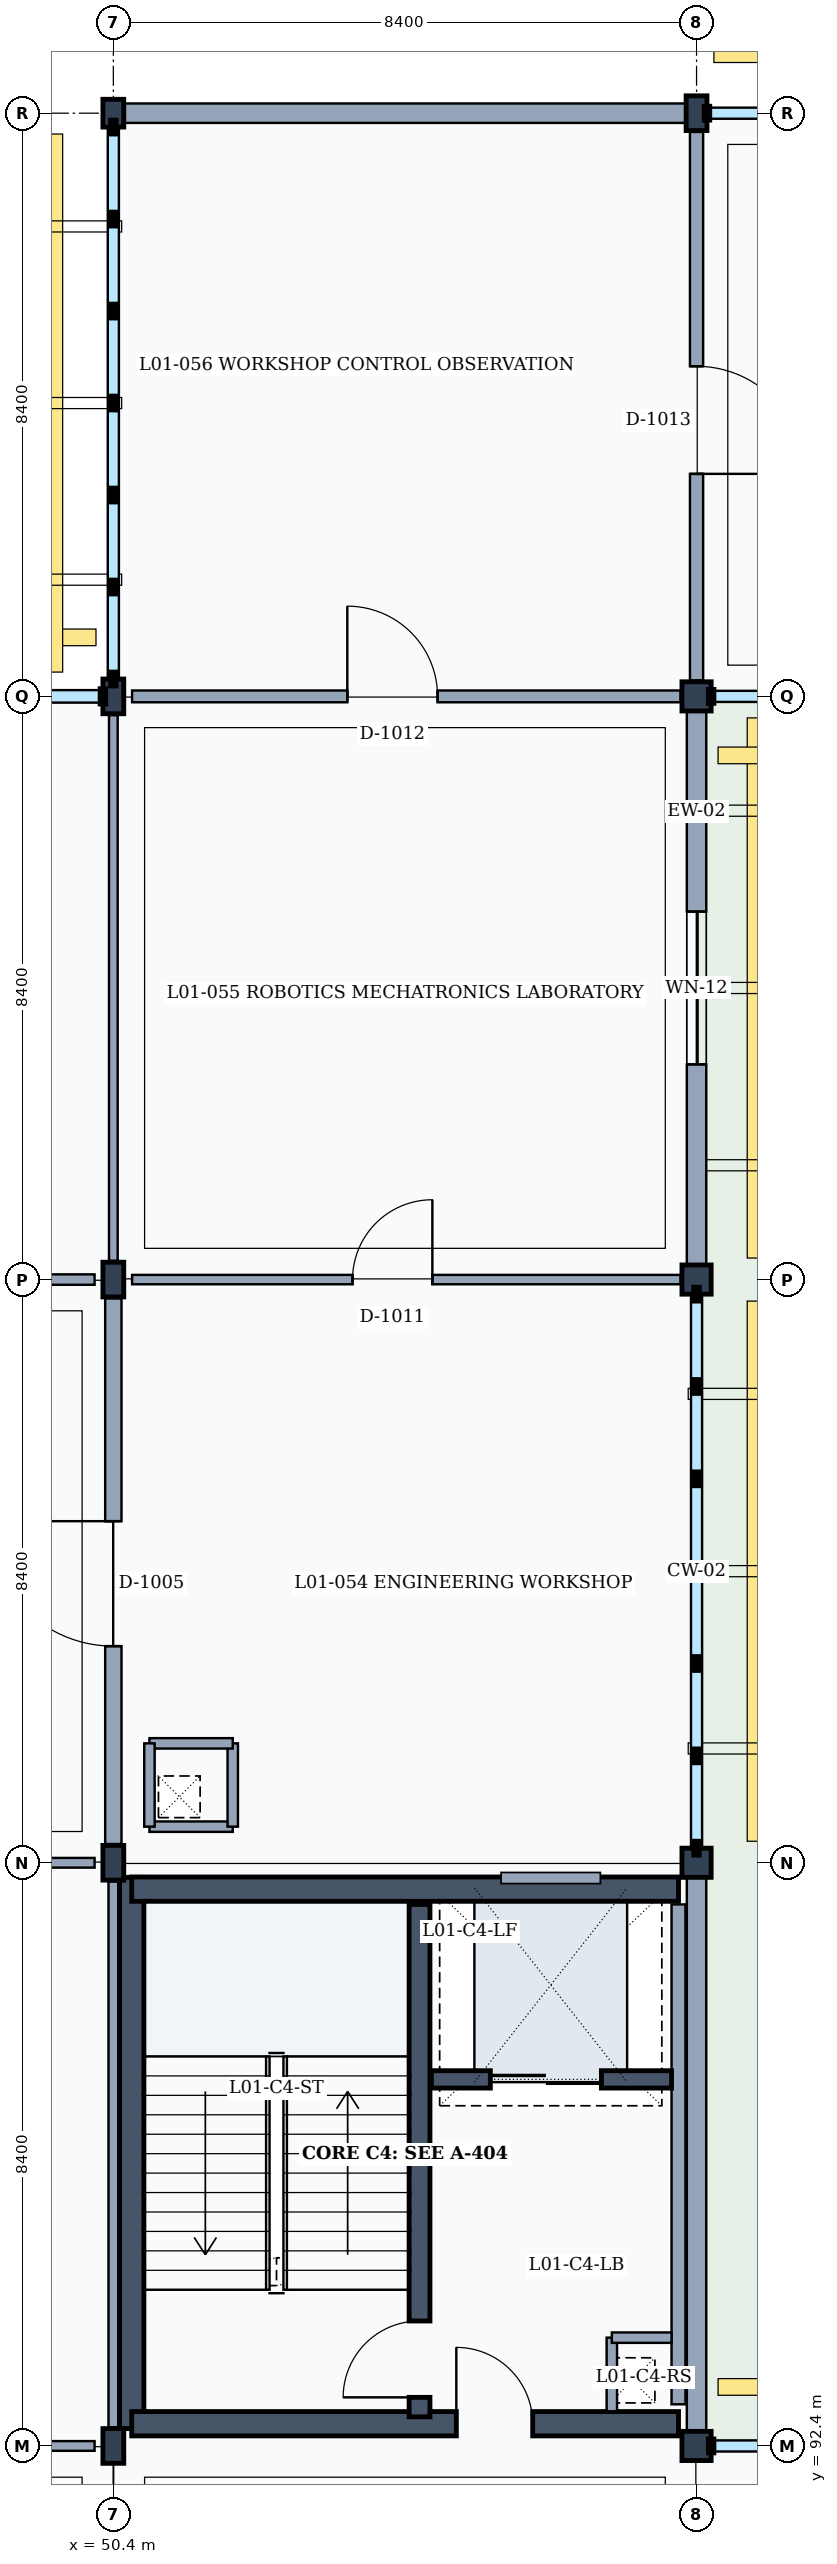
"""IFC4 building model, lengths in metres.
Left out: names, types, materials, properties, quantities, classifications, styles, units other than length and angle.
Written with IfcOpenShell. Run it as: python <this file> out.ifc"""

import sys

from ifc_helpers import new_model, si_unit, direction, frame, frame_2d, origin, origin_2d, place, context, subcontext, project, spatial, rectangle, i_section, extrude, element, fill, save


model = new_model("IFC4")
c1 = context("Model", 3, precision=1e-05, world=origin(), true_north=direction((0.0, 1.0)))
c2 = subcontext(c1, "Body", "Model", "MODEL_VIEW")
j1 = project(units=[si_unit("LENGTHUNIT", "METRE"), si_unit("PLANEANGLEUNIT", "RADIAN")], contexts=[c1])
p1 = place(None, origin())
s1 = spatial("IfcSite", under=j1, at=p1, CompositionType="ELEMENT")
p2 = place(p1, origin())
s2 = spatial("IfcBuilding", under=s1, at=p2, CompositionType="ELEMENT")
p3 = place(p2, frame((0.0, 0.0, 4.8)))
s3 = spatial("IfcBuildingStorey", under=s2, at=p3, CompositionType="ELEMENT", Elevation=4.8)
for number, where, z_axis, x_axis in (
    (1, (50.4, 92.4, 0.0), (0.0, 0.0, 1.0), (1.0, 0.0, 0.0)),
    (2, (50.4, 100.8, 0.0), (0.0, 0.0, 1.0), (1.0, 0.0, 0.0)),
    (3, (50.4, 109.2, 0.0), (0.0, 0.0, 1.0), (1.0, 0.0, 0.0)),
    (4, (50.4, 117.6, 0.0), (0.0, 0.0, 1.0), (1.0, 0.0, 0.0)),
):
    element("IfcColumn", number, at=place(p3, frame(where, z_axis=z_axis, x_axis=x_axis)), inside=s3, PredefinedType="COLUMN", context=c2, shape_type="SweptSolid", body=[
        extrude(i_section(OverallWidth=0.3, OverallDepth=0.5, WebThickness=0.014, FlangeThickness=0.028, FilletRadius=0.027, at=origin_2d()), origin(), (0.0, 0.0, 1.0), 4.8),
    ])
p4 = place(p3, frame((50.4, 126.0, 0.0), z_axis=(0.0, 0.0, 1.0), x_axis=(1.0, 0.0, 0.0)))
e5 = element("IfcColumn", 5, at=p4, inside=s3, PredefinedType="COLUMN", context=c2, shape_type="SweptSolid", body=[
    extrude(i_section(OverallWidth=0.3, OverallDepth=0.4, WebThickness=0.013, FlangeThickness=0.024, FilletRadius=0.027, at=origin_2d()), origin(), (0.0, 0.0, 1.0), 4.8),
])
for number, where, z_axis, x_axis in (
    (6, (58.8, 92.4, 0.0), (0.0, 0.0, 1.0), (1.0, 0.0, 0.0)),
    (7, (58.8, 100.8, 0.0), (0.0, 0.0, 1.0), (1.0, 0.0, 0.0)),
    (8, (58.8, 109.2, 0.0), (0.0, 0.0, 1.0), (1.0, 0.0, 0.0)),
    (9, (58.8, 117.6, 0.0), (0.0, 0.0, 1.0), (1.0, 0.0, 0.0)),
):
    element("IfcColumn", number, at=place(p3, frame(where, z_axis=z_axis, x_axis=x_axis)), inside=s3, PredefinedType="COLUMN", context=c2, shape_type="SweptSolid", body=[
        extrude(rectangle(XDim=0.42, YDim=0.42, at=origin_2d()), origin(), (0.0, 0.0, 1.0), 4.8),
    ])
p5 = place(p3, frame((58.8, 126.0, 0.0), z_axis=(0.0, 0.0, 1.0), x_axis=(1.0, 0.0, 0.0)))
e10 = element("IfcColumn", 10, at=p5, inside=s3, PredefinedType="COLUMN", context=c2, shape_type="SweptSolid", body=[
    extrude(i_section(OverallWidth=0.3, OverallDepth=0.5, WebThickness=0.014, FlangeThickness=0.028, FilletRadius=0.027, at=origin_2d()), origin(), (0.0, 0.0, 1.0), 4.8),
])
p6 = place(p3, frame((58.8, 100.59, 0.0), z_axis=(0.0, 0.0, 1.0), x_axis=(0.0, -1.0, 0.0)))
e11 = element("IfcWall", 11, at=p6, inside=s3, PredefinedType="SOLIDWALL", context=c2, shape_type="SweptSolid", body=[
    extrude(rectangle(XDim=7.98, YDim=0.28, at=frame_2d((3.99, 0.0))), origin(), (0.0, 0.0, 1.0), 3.96),
])
p7 = place(p3, frame((58.8, 117.39, 0.0), z_axis=(0.0, 0.0, 1.0), x_axis=(0.0, -1.0, 0.0)))
e12 = element("IfcWall", 12, at=p7, inside=s3, PredefinedType="SOLIDWALL", context=c2, shape_type="SweptSolid", body=[
    extrude(rectangle(XDim=7.98, YDim=0.28, at=frame_2d((3.99, 0.0))), origin(), (0.0, 0.0, 1.0), 3.96),
])
p8 = place(p7, frame((2.89, 0.0, 0.9)))
e13 = element("IfcOpeningElement", 13, at=p8, cuts=e12, PredefinedType="OPENING", context=c2, shape_type="SweptSolid", body=[
    extrude(rectangle(XDim=2.2, YDim=1.9, at=frame_2d((1.1, 0.95))), frame((0.0, 0.15, 0.0), z_axis=(0.0, -1.0, 0.0), x_axis=(1.0, 0.0, 0.0)), (0.0, 0.0, 1.0), 0.3),
])
p9 = place(p3, frame((50.55, 126.0, 0.0), z_axis=(0.0, 0.0, 1.0), x_axis=(1.0, 0.0, 0.0)))
e14 = element("IfcWall", 14, at=p9, inside=s3, PredefinedType="SOLIDWALL", context=c2, shape_type="SweptSolid", body=[
    extrude(rectangle(XDim=8.1, YDim=0.28, at=frame_2d((4.05, 0.0))), origin(), (0.0, 0.0, 1.0), 3.96),
])
p10 = place(p3, frame((50.665, 92.65, 0.0), z_axis=(0.0, 0.0, 1.0), x_axis=(0.0, 1.0, 0.0)))
e15 = element("IfcWall", 15, at=p10, inside=s3, PredefinedType="SHEAR", context=c2, shape_type="SweptSolid", body=[
    extrude(rectangle(XDim=7.94, YDim=0.35, at=frame_2d((3.97, 0.0))), origin(), (0.0, 0.0, 1.0), 4.56),
])
p11 = place(p3, frame((50.665, 100.42, 0.0), z_axis=(0.0, 0.0, 1.0), x_axis=(1.0, 0.0, 0.0)))
e16 = element("IfcWall", 16, at=p11, inside=s3, PredefinedType="SHEAR", context=c2, shape_type="SweptSolid", body=[
    extrude(rectangle(XDim=7.875, YDim=0.35, at=frame_2d((3.938, 0.0))), origin(), (0.0, 0.0, 1.0), 4.56),
])
p12 = place(p3, frame((58.54, 100.2, 0.0), z_axis=(0.0, 0.0, 1.0), x_axis=(0.0, -1.0, 0.0)))
e17 = element("IfcWall", 17, at=p12, inside=s3, PredefinedType="PARTITIONING", context=c2, shape_type="SweptSolid", body=[
    extrude(rectangle(XDim=7.2, YDim=0.2, at=frame_2d((3.6, 0.0))), origin(), (0.0, 0.0, 1.0), 3.92),
])
p13 = place(p3, frame((58.54, 92.72, 0.0), z_axis=(0.0, 0.0, 1.0), x_axis=(-1.0, 0.0, 0.0)))
e18 = element("IfcWall", 18, at=p13, inside=s3, PredefinedType="SHEAR", context=c2, shape_type="SweptSolid", body=[
    extrude(rectangle(XDim=7.875, YDim=0.35, at=frame_2d((3.938, 0.0))), origin(), (0.0, 0.0, 1.0), 4.56),
])
p14 = place(p13, frame((2.1, 0.0, 0.0)))
e19 = element("IfcOpeningElement", 19, at=p14, cuts=e18, PredefinedType="OPENING", context=c2, shape_type="SweptSolid", body=[
    extrude(rectangle(XDim=1.1, YDim=2.15, at=frame_2d((0.55, 1.075))), frame((0.0, 0.185, 0.0), z_axis=(0.0, -1.0, 0.0), x_axis=(1.0, 0.0, 0.0)), (0.0, 0.0, 1.0), 0.37),
])
p15 = place(p3, frame((54.81, 92.82, 0.0), z_axis=(0.0, 0.0, 1.0), x_axis=(0.0, 1.0, 0.0)))
e20 = element("IfcWall", 20, at=p15, inside=s3, PredefinedType="SHEAR", context=c2, shape_type="SweptSolid", body=[
    extrude(rectangle(XDim=7.38, YDim=0.3, at=frame_2d((3.69, 0.0))), origin(), (0.0, 0.0, 1.0), 4.56),
])
p16 = place(p15, frame((0.28, 0.0, 0.0)))
e21 = element("IfcOpeningElement", 21, at=p16, cuts=e20, PredefinedType="OPENING", context=c2, shape_type="SweptSolid", body=[
    extrude(rectangle(XDim=1.1, YDim=2.15, at=frame_2d((0.55, 1.075))), frame((0.0, 0.16, 0.0), z_axis=(0.0, -1.0, 0.0), x_axis=(1.0, 0.0, 0.0)), (0.0, 0.0, 1.0), 0.32),
])
p17 = place(p3, frame((57.58, 93.96, 0.0), z_axis=(0.0, 0.0, 1.0), x_axis=(0.0, -1.0, 0.0)))
e22 = element("IfcWall", 22, at=p17, inside=s3, PredefinedType="PARTITIONING", context=c2, shape_type="SweptSolid", body=[
    extrude(rectangle(XDim=1.06, YDim=0.15, at=frame_2d((0.53, 0.0))), origin(), (0.0, 0.0, 1.0), 3.92),
])
p18 = place(p3, frame((57.58, 93.96, 0.0), z_axis=(0.0, 0.0, 1.0), x_axis=(1.0, 0.0, 0.0)))
e23 = element("IfcWall", 23, at=p18, inside=s3, PredefinedType="PARTITIONING", context=c2, shape_type="SweptSolid", body=[
    extrude(rectangle(XDim=0.86, YDim=0.15, at=frame_2d((0.43, 0.0))), origin(), (0.0, 0.0, 1.0), 3.92),
])
p19 = place(p3, frame((54.98, 97.68, 0.0), z_axis=(0.0, 0.0, 1.0), x_axis=(1.0, 0.0, 0.0)))
e24 = element("IfcWall", 24, at=p19, inside=s3, PredefinedType="SHEAR", context=c2, shape_type="SweptSolid", body=[
    extrude(rectangle(XDim=3.46, YDim=0.25, at=frame_2d((1.73, 0.0))), origin(), (0.0, 0.0, 1.0), 4.56),
])
p20 = place(p19, frame((0.85, 0.0, 0.0)))
e25 = element("IfcOpeningElement", 25, at=p20, cuts=e24, PredefinedType="OPENING", context=c2, shape_type="SweptSolid", body=[
    extrude(rectangle(XDim=1.6, YDim=2.3, at=frame_2d((0.8, 1.15))), frame((0.0, 0.135, 0.0), z_axis=(0.0, -1.0, 0.0), x_axis=(1.0, 0.0, 0.0)), (0.0, 0.0, 1.0), 0.27),
])
p21 = place(p3, frame((50.92, 101.32, 0.0), z_axis=(0.0, 0.0, 1.0), x_axis=(1.0, 0.0, 0.0)))
e26 = element("IfcWall", 26, at=p21, inside=s3, PredefinedType="PARTITIONING", context=c2, shape_type="SweptSolid", body=[
    extrude(rectangle(XDim=1.2, YDim=0.15, at=frame_2d((0.6, 0.0))), origin(), (0.0, 0.0, 1.0), 4.56),
])
p22 = place(p3, frame((52.12, 101.32, 0.0), z_axis=(0.0, 0.0, 1.0), x_axis=(0.0, 1.0, 0.0)))
e27 = element("IfcWall", 27, at=p22, inside=s3, PredefinedType="PARTITIONING", context=c2, shape_type="SweptSolid", body=[
    extrude(rectangle(XDim=1.2, YDim=0.15, at=frame_2d((0.6, 0.0))), origin(), (0.0, 0.0, 1.0), 4.56),
])
p23 = place(p3, frame((52.12, 102.52, 0.0), z_axis=(0.0, 0.0, 1.0), x_axis=(-1.0, 0.0, 0.0)))
e28 = element("IfcWall", 28, at=p23, inside=s3, PredefinedType="PARTITIONING", context=c2, shape_type="SweptSolid", body=[
    extrude(rectangle(XDim=1.2, YDim=0.15, at=frame_2d((0.6, 0.0))), origin(), (0.0, 0.0, 1.0), 4.56),
])
p24 = place(p3, frame((50.92, 102.52, 0.0), z_axis=(0.0, 0.0, 1.0), x_axis=(0.0, -1.0, 0.0)))
e29 = element("IfcWall", 29, at=p24, inside=s3, PredefinedType="PARTITIONING", context=c2, shape_type="SweptSolid", body=[
    extrude(rectangle(XDim=1.2, YDim=0.15, at=frame_2d((0.6, 0.0))), origin(), (0.0, 0.0, 1.0), 4.56),
])
p25 = place(p3, frame((42.19, 92.4, 0.0), z_axis=(0.0, 0.0, 1.0), x_axis=(1.0, 0.0, 0.0)))
e30 = element("IfcWall", 30, at=p25, inside=s3, PredefinedType="PARTITIONING", context=c2, shape_type="SweptSolid", body=[
    extrude(rectangle(XDim=7.94, YDim=0.14, at=frame_2d((3.97, 0.0))), origin(), (0.0, 0.0, 1.0), 3.89),
])
p26 = place(p25, frame((3.275, 0.0, 0.0)))
e31 = element("IfcOpeningElement", 31, at=p26, cuts=e30, PredefinedType="OPENING", context=c2, shape_type="SweptSolid", body=[
    extrude(rectangle(XDim=0.95, YDim=2.15, at=frame_2d((0.475, 1.075))), frame((0.0, 0.08, 0.0), z_axis=(0.0, -1.0, 0.0), x_axis=(1.0, 0.0, 0.0)), (0.0, 0.0, 1.0), 0.16),
])
p27 = place(p3, frame((50.4, 92.67, 0.0), z_axis=(0.0, 0.0, 1.0), x_axis=(0.0, 1.0, 0.0)))
e32 = element("IfcWall", 32, at=p27, inside=s3, PredefinedType="PARTITIONING", context=c2, shape_type="SweptSolid", body=[
    extrude(rectangle(XDim=7.86, YDim=0.14, at=frame_2d((3.93, 0.0))), origin(), (0.0, 0.0, 1.0), 3.92),
])
p28 = place(p3, frame((42.2, 100.8, 0.0), z_axis=(0.0, 0.0, 1.0), x_axis=(1.0, 0.0, 0.0)))
e33 = element("IfcWall", 33, at=p28, inside=s3, PredefinedType="PARTITIONING", context=c2, shape_type="SweptSolid", body=[
    extrude(rectangle(XDim=7.93, YDim=0.14, at=frame_2d((3.965, 0.0))), origin(), (0.0, 0.0, 1.0), 3.89),
])
p29 = place(p3, frame((50.4, 101.07, 0.0), z_axis=(0.0, 0.0, 1.0), x_axis=(0.0, 1.0, 0.0)))
e34 = element("IfcWall", 34, at=p29, inside=s3, PredefinedType="PARTITIONING", context=c2, shape_type="SweptSolid", body=[
    extrude(rectangle(XDim=7.86, YDim=0.235, at=frame_2d((3.93, 0.0))), origin(), (0.0, 0.0, 1.0), 3.92),
])
p30 = place(p29, frame((2.85, 0.0, 0.0)))
e35 = element("IfcOpeningElement", 35, at=p30, cuts=e34, PredefinedType="OPENING", context=c2, shape_type="SweptSolid", body=[
    extrude(rectangle(XDim=1.8, YDim=2.3, at=frame_2d((0.9, 1.15))), frame((0.0, 0.127, 0.0), z_axis=(0.0, -1.0, 0.0), x_axis=(1.0, 0.0, 0.0)), (0.0, 0.0, 1.0), 0.255),
])
p31 = place(p3, frame((42.19, 109.2, 0.0), z_axis=(0.0, 0.0, 1.0), x_axis=(1.0, 0.0, 0.0)))
e36 = element("IfcWall", 36, at=p31, inside=s3, PredefinedType="PARTITIONING", context=c2, shape_type="SweptSolid", body=[
    extrude(rectangle(XDim=7.94, YDim=0.15, at=frame_2d((3.97, 0.0))), origin(), (0.0, 0.0, 1.0), 3.89),
])
p32 = place(p31, frame((3.15, 0.0, 0.0)))
e37 = element("IfcOpeningElement", 37, at=p32, cuts=e36, PredefinedType="OPENING", context=c2, shape_type="SweptSolid", body=[
    extrude(rectangle(XDim=1.2, YDim=2.2, at=frame_2d((0.6, 1.1))), frame((0.0, 0.085, 0.0), z_axis=(0.0, -1.0, 0.0), x_axis=(1.0, 0.0, 0.0)), (0.0, 0.0, 1.0), 0.17),
])
p33 = place(p3, frame((50.4, 109.47, 0.0), z_axis=(0.0, 0.0, 1.0), x_axis=(0.0, 1.0, 0.0)))
e38 = element("IfcWall", 38, at=p33, inside=s3, PredefinedType="PARTITIONING", context=c2, shape_type="SweptSolid", body=[
    extrude(rectangle(XDim=7.86, YDim=0.125, at=frame_2d((3.93, 0.0))), origin(), (0.0, 0.0, 1.0), 3.92),
])
p34 = place(p3, frame((50.67, 109.2, 0.0), z_axis=(0.0, 0.0, 1.0), x_axis=(1.0, 0.0, 0.0)))
e39 = element("IfcWall", 39, at=p34, inside=s3, PredefinedType="PARTITIONING", context=c2, shape_type="SweptSolid", body=[
    extrude(rectangle(XDim=7.9, YDim=0.135, at=frame_2d((3.95, 0.0))), origin(), (0.0, 0.0, 1.0), 3.92),
])
p35 = place(p34, frame((3.175, 0.0, 0.0)))
e40 = element("IfcOpeningElement", 40, at=p35, cuts=e39, PredefinedType="OPENING", context=c2, shape_type="SweptSolid", body=[
    extrude(rectangle(XDim=1.15, YDim=2.25, at=frame_2d((0.575, 1.125))), frame((0.0, 0.077, 0.0), z_axis=(0.0, -1.0, 0.0), x_axis=(1.0, 0.0, 0.0)), (0.0, 0.0, 1.0), 0.155),
])
p36 = place(p3, frame((50.67, 117.6, 0.0), z_axis=(0.0, 0.0, 1.0), x_axis=(1.0, 0.0, 0.0)))
e41 = element("IfcWall", 41, at=p36, inside=s3, PredefinedType="PARTITIONING", context=c2, shape_type="SweptSolid", body=[
    extrude(rectangle(XDim=7.9, YDim=0.17, at=frame_2d((3.95, 0.0))), origin(), (0.0, 0.0, 1.0), 3.92),
])
p37 = place(p36, frame((3.1, 0.0, 0.0)))
e42 = element("IfcOpeningElement", 42, at=p37, cuts=e41, PredefinedType="OPENING", context=c2, shape_type="SweptSolid", body=[
    extrude(rectangle(XDim=1.3, YDim=2.2, at=frame_2d((0.65, 1.1))), frame((0.0, 0.095, 0.0), z_axis=(0.0, -1.0, 0.0), x_axis=(1.0, 0.0, 0.0)), (0.0, 0.0, 1.0), 0.19),
])
p38 = place(p3, frame((58.8, 117.83, 0.0), z_axis=(0.0, 0.0, 1.0), x_axis=(0.0, 1.0, 0.0)))
e43 = element("IfcWall", 43, at=p38, inside=s3, PredefinedType="PARTITIONING", context=c2, shape_type="SweptSolid", body=[
    extrude(rectangle(XDim=7.9, YDim=0.19, at=frame_2d((3.95, 0.0))), origin(), (0.0, 0.0, 1.0), 3.92),
])
p39 = place(p38, frame((2.975, 0.0, 0.0)))
e44 = element("IfcOpeningElement", 44, at=p39, cuts=e43, PredefinedType="OPENING", context=c2, shape_type="SweptSolid", body=[
    extrude(rectangle(XDim=1.55, YDim=2.35, at=frame_2d((0.775, 1.175))), frame((0.0, 0.105, 0.0), z_axis=(0.0, -1.0, 0.0), x_axis=(1.0, 0.0, 0.0)), (0.0, 0.0, 1.0), 0.21),
])
p40 = place(p8, origin())
e45 = element("IfcWindow", 45, at=p40, inside=s3, PartitioningType="SINGLE_PANEL", PredefinedType="WINDOW", context=c2, shape_type="SweptSolid", body=[
    extrude(rectangle(XDim=2.2, YDim=1.9, at=frame_2d((1.1, 0.95))), frame((0.0, 0.03, 0.0), z_axis=(0.0, -1.0, 0.0), x_axis=(1.0, 0.0, 0.0)), (0.0, 0.0, 1.0), 0.06),
])
fill(e13, e45)
p41 = place(p14, frame((1.1, 0.0, 0.0), z_axis=(0.0, 0.0, 1.0), x_axis=(-1.0, 0.0, 0.0)))
e46 = element("IfcDoor", 46, at=p41, inside=s3, OperationType="SINGLE_SWING_LEFT", PredefinedType="DOOR", context=c2, shape_type="SweptSolid", body=[
    extrude(rectangle(XDim=1.1, YDim=2.15, at=frame_2d((0.55, 1.075))), frame((0.0, 0.025, 0.0), z_axis=(0.0, -1.0, 0.0), x_axis=(1.0, 0.0, 0.0)), (0.0, 0.0, 1.0), 0.05),
])
fill(e19, e46)
p42 = place(p16, origin())
e47 = element("IfcDoor", 47, at=p42, inside=s3, OperationType="SINGLE_SWING_LEFT", PredefinedType="DOOR", context=c2, shape_type="SweptSolid", body=[
    extrude(rectangle(XDim=1.1, YDim=2.15, at=frame_2d((0.55, 1.075))), frame((0.0, 0.025, 0.0), z_axis=(0.0, -1.0, 0.0), x_axis=(1.0, 0.0, 0.0)), (0.0, 0.0, 1.0), 0.05),
])
fill(e21, e47)
p43 = place(p20, origin())
e48 = element("IfcDoor", 48, at=p43, inside=s3, OperationType="DOUBLE_DOOR_SLIDING", PredefinedType="DOOR", context=c2, shape_type="SweptSolid", body=[
    extrude(rectangle(XDim=1.6, YDim=2.3, at=frame_2d((0.8, 1.15))), frame((0.0, 0.025, 0.0), z_axis=(0.0, -1.0, 0.0), x_axis=(1.0, 0.0, 0.0)), (0.0, 0.0, 1.0), 0.05),
])
fill(e25, e48)
p44 = place(p30, origin())
e49 = element("IfcDoor", 49, at=p44, inside=s3, OperationType="SINGLE_SWING_RIGHT", PredefinedType="DOOR", context=c2, shape_type="SweptSolid", body=[
    extrude(rectangle(XDim=1.8, YDim=2.3, at=frame_2d((0.9, 1.15))), frame((0.0, 0.025, 0.0), z_axis=(0.0, -1.0, 0.0), x_axis=(1.0, 0.0, 0.0)), (0.0, 0.0, 1.0), 0.05),
])
fill(e35, e49)
p45 = place(p35, origin())
e50 = element("IfcDoor", 50, at=p45, inside=s3, OperationType="SINGLE_SWING_RIGHT", PredefinedType="DOOR", context=c2, shape_type="SweptSolid", body=[
    extrude(rectangle(XDim=1.15, YDim=2.25, at=frame_2d((0.575, 1.125))), frame((0.0, 0.025, 0.0), z_axis=(0.0, -1.0, 0.0), x_axis=(1.0, 0.0, 0.0)), (0.0, 0.0, 1.0), 0.05),
])
fill(e40, e50)
p46 = place(p37, origin())
e51 = element("IfcDoor", 51, at=p46, inside=s3, OperationType="SINGLE_SWING_LEFT", PredefinedType="DOOR", context=c2, shape_type="SweptSolid", body=[
    extrude(rectangle(XDim=1.3, YDim=2.2, at=frame_2d((0.65, 1.1))), frame((0.0, 0.025, 0.0), z_axis=(0.0, -1.0, 0.0), x_axis=(1.0, 0.0, 0.0)), (0.0, 0.0, 1.0), 0.05),
])
fill(e42, e51)
p47 = place(p39, frame((1.55, 0.0, 0.0), z_axis=(0.0, 0.0, 1.0), x_axis=(-1.0, 0.0, 0.0)))
e52 = element("IfcDoor", 52, at=p47, inside=s3, OperationType="SINGLE_SWING_RIGHT", PredefinedType="DOOR", context=c2, shape_type="SweptSolid", body=[
    extrude(rectangle(XDim=1.55, YDim=2.35, at=frame_2d((0.775, 1.175))), frame((0.0, 0.025, 0.0), z_axis=(0.0, -1.0, 0.0), x_axis=(1.0, 0.0, 0.0)), (0.0, 0.0, 1.0), 0.05),
])
fill(e44, e52)
save(model, sys.argv[1])
